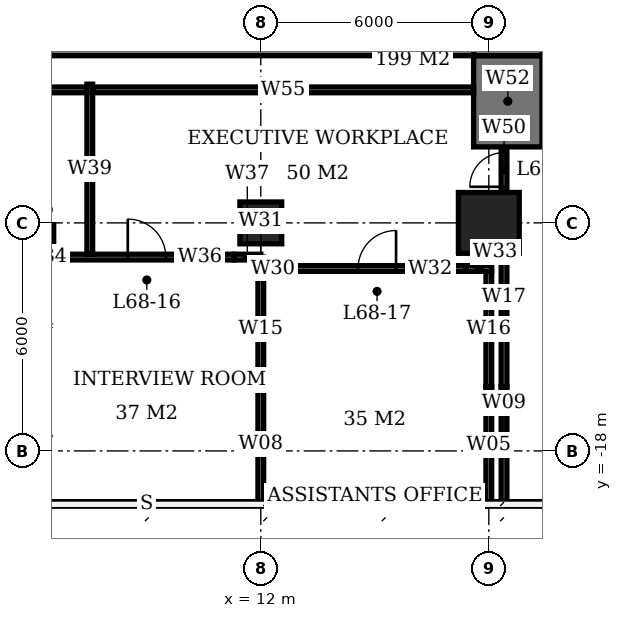
"""IFC4 building model, lengths in metres.
Left out: names, types, materials, properties, quantities, classifications, styles, units other than length and angle.
Written with IfcOpenShell. Run it as: python <this file> out.ifc"""

import sys

from ifc_helpers import new_model, si_unit, direction, frame, frame_2d, origin, origin_2d, place, context, subcontext, project, spatial, rectangle, extrude, element, fill, save


model = new_model("IFC4")
c1 = context("Model", 3, precision=1e-05, world=origin(), true_north=direction((0.0, 1.0)))
c2 = subcontext(c1, "Body", "Model", "MODEL_VIEW")
j1 = project(units=[si_unit("LENGTHUNIT", "METRE"), si_unit("PLANEANGLEUNIT", "RADIAN")], contexts=[c1])
p1 = place(None, origin())
s1 = spatial("IfcSite", under=j1, at=p1, CompositionType="ELEMENT")
p2 = place(p1, origin())
s2 = spatial("IfcBuilding", under=s1, at=p2, CompositionType="ELEMENT")
p3 = place(p2, frame((0.0, 0.0, 276.2)))
s3 = spatial("IfcBuildingStorey", under=s2, at=p3, CompositionType="ELEMENT", Elevation=276.2)
for number, where, z_axis, x_axis in (
    (1, (6.0, -12.0, 0.0), (0.0, 0.0, 1.0), (1.0, 0.0, 0.0)),
    (2, (12.0, -12.0, 0.0), (0.0, 0.0, 1.0), (1.0, 0.0, 0.0)),
):
    element("IfcColumn", number, at=place(p3, frame(where, z_axis=z_axis, x_axis=x_axis)), inside=s3, PredefinedType="COLUMN", context=c2, shape_type="SweptSolid", body=[
        extrude(rectangle(XDim=1.1, YDim=1.1, at=origin_2d()), origin(), (0.0, 0.0, 1.0), 3.9),
    ])
p4 = place(p3, frame((18.0, -12.0, 0.0), z_axis=(0.0, 0.0, 1.0), x_axis=(1.0, 0.0, 0.0)))
e3 = element("IfcColumn", 3, at=p4, inside=s3, PredefinedType="COLUMN", context=c2, shape_type="SweptSolid", body=[
    extrude(rectangle(XDim=1.6, YDim=1.6, at=origin_2d()), origin(), (0.0, 0.0, 1.0), 3.9),
])
p5 = place(p3, frame((-5.6, -6.6, 0.0), z_axis=(0.0, 0.0, 1.0), x_axis=(1.0, 0.0, 0.0)))
e4 = element("IfcWall", 4, at=p5, inside=s3, PredefinedType="SHEAR", context=c2, shape_type="SweptSolid", body=[
    extrude(rectangle(XDim=23.2, YDim=2.0, at=frame_2d((11.6, 0.0))), origin(), (0.0, 0.0, 1.0), 3.9),
])
p6 = place(p3, frame((18.5, -7.6, 0.0), z_axis=(0.0, 0.0, 1.0), x_axis=(0.0, 1.0, 0.0)))
e5 = element("IfcWall", 5, at=p6, inside=s3, PredefinedType="SHEAR", context=c2, shape_type="SweptSolid", body=[
    extrude(rectangle(XDim=21.2, YDim=1.8, at=frame_2d((10.6, 0.0))), origin(), (0.0, 0.0, 1.0), 3.9),
])
p7 = place(p6, frame((9.2, 0.0, 0.0)))
e6 = element("IfcOpeningElement", 6, at=p7, cuts=e5, PredefinedType="OPENING", context=c2, shape_type="SweptSolid", body=[
    extrude(rectangle(XDim=1.8, YDim=2.4, at=frame_2d((0.9, 1.2))), frame((0.0, 0.91, 0.0), z_axis=(0.0, -1.0, 0.0), x_axis=(1.0, 0.0, 0.0)), (0.0, 0.0, 1.0), 1.82),
])
p8 = place(p3, frame((18.5, -10.0, 0.0), z_axis=(0.0, 0.0, 1.0), x_axis=(0.0, 1.0, 0.0)))
e7 = element("IfcWall", 7, at=p8, inside=s3, PredefinedType="SHEAR", context=c2, shape_type="SweptSolid", body=[
    extrude(rectangle(XDim=2.4, YDim=1.8, at=frame_2d((1.2, 0.0))), origin(), (0.0, 0.0, 1.0), 3.9),
])
p9 = place(p3, frame((11.925, -13.2, 0.0), z_axis=(0.0, 0.0, 1.0), x_axis=(1.0, 0.0, 0.0)))
e8 = element("IfcWall", 8, at=p9, inside=s3, PredefinedType="PARTITIONING", context=c2, shape_type="SweptSolid", body=[
    extrude(rectangle(XDim=0.785, YDim=0.15, at=frame_2d((0.393, 0.0))), origin(), (0.0, 0.0, 1.0), 2.65),
])
p10 = place(p3, frame((12.71, -13.2, 0.0), z_axis=(0.0, 0.0, 1.0), x_axis=(1.0, 0.0, 0.0)))
e9 = element("IfcWall", 9, at=p10, inside=s3, PredefinedType="PARTITIONING", context=c2, shape_type="SweptSolid", body=[
    extrude(rectangle(XDim=4.698, YDim=0.15, at=frame_2d((2.349, 0.0))), origin(), (0.0, 0.0, 1.0), 3.65),
])
p11 = place(p10, frame((1.849, 0.0, 0.0)))
e10 = element("IfcOpeningElement", 10, at=p11, cuts=e9, PredefinedType="OPENING", context=c2, shape_type="SweptSolid", body=[
    extrude(rectangle(XDim=1.0, YDim=2.4, at=frame_2d((0.5, 1.2))), frame((0.0, 0.085, 0.0), z_axis=(0.0, -1.0, 0.0), x_axis=(1.0, 0.0, 0.0)), (0.0, 0.0, 1.0), 0.17),
])
p12 = place(p3, frame((17.408, -13.2, 0.0), z_axis=(0.0, 0.0, 1.0), x_axis=(1.0, 0.0, 0.0)))
e11 = element("IfcWall", 11, at=p12, inside=s3, PredefinedType="PARTITIONING", context=c2, shape_type="SweptSolid", body=[
    extrude(rectangle(XDim=0.667, YDim=0.15, at=frame_2d((0.333, 0.0))), origin(), (0.0, 0.0, 1.0), 2.65),
])
p13 = place(p3, frame((5.925, -12.9, 0.0), z_axis=(0.0, 0.0, 1.0), x_axis=(1.0, 0.0, 0.0)))
e12 = element("IfcWall", 12, at=p13, inside=s3, PredefinedType="PARTITIONING", context=c2, shape_type="SweptSolid", body=[
    extrude(rectangle(XDim=0.785, YDim=0.15, at=frame_2d((0.393, 0.0))), origin(), (0.0, 0.0, 1.0), 2.65),
])
p14 = place(p3, frame((6.71, -12.9, 0.0), z_axis=(0.0, 0.0, 1.0), x_axis=(1.0, 0.0, 0.0)))
e13 = element("IfcWall", 13, at=p14, inside=s3, PredefinedType="PARTITIONING", context=c2, shape_type="SweptSolid", body=[
    extrude(rectangle(XDim=4.58, YDim=0.15, at=frame_2d((2.29, 0.0))), origin(), (0.0, 0.0, 1.0), 3.65),
])
p15 = place(p14, frame((1.79, 0.0, 0.0)))
e14 = element("IfcOpeningElement", 14, at=p15, cuts=e13, PredefinedType="OPENING", context=c2, shape_type="SweptSolid", body=[
    extrude(rectangle(XDim=1.0, YDim=2.4, at=frame_2d((0.5, 1.2))), frame((0.0, 0.085, 0.0), z_axis=(0.0, -1.0, 0.0), x_axis=(1.0, 0.0, 0.0)), (0.0, 0.0, 1.0), 0.17),
])
p16 = place(p3, frame((11.29, -12.9, 0.0), z_axis=(0.0, 0.0, 1.0), x_axis=(1.0, 0.0, 0.0)))
e15 = element("IfcWall", 15, at=p16, inside=s3, PredefinedType="PARTITIONING", context=c2, shape_type="SweptSolid", body=[
    extrude(rectangle(XDim=0.71, YDim=0.15, at=frame_2d((0.355, 0.0))), origin(), (0.0, 0.0, 1.0), 2.65),
])
p17 = place(p3, frame((12.0, -19.35, 0.0), z_axis=(0.0, 0.0, 1.0), x_axis=(0.0, 1.0, 0.0)))
e16 = element("IfcWall", 16, at=p17, inside=s3, PredefinedType="PARTITIONING", context=c2, shape_type="SweptSolid", body=[
    extrude(rectangle(XDim=3.04, YDim=0.15, at=frame_2d((1.52, 0.0))), origin(), (0.0, 0.0, 1.0), 3.65),
])
p18 = place(p3, frame((12.0, -16.31, 0.0), z_axis=(0.0, 0.0, 1.0), x_axis=(0.0, 1.0, 0.0)))
e17 = element("IfcWall", 17, at=p18, inside=s3, PredefinedType="PARTITIONING", context=c2, shape_type="SweptSolid", body=[
    extrude(rectangle(XDim=3.035, YDim=0.15, at=frame_2d((1.518, 0.0))), origin(), (0.0, 0.0, 1.0), 2.65),
])
p19 = place(p3, frame((12.0, -13.2, 0.0), z_axis=(0.0, 0.0, 1.0), x_axis=(0.0, 1.0, 0.0)))
e18 = element("IfcWall", 18, at=p19, inside=s3, PredefinedType="PARTITIONING", context=c2, shape_type="SweptSolid", body=[
    extrude(rectangle(XDim=0.3, YDim=0.15, at=frame_2d((0.15, 0.0))), origin(), (0.0, 0.0, 1.0), 2.65),
])
p20 = place(p3, frame((18.0, -19.375, 0.0), z_axis=(0.0, 0.0, 1.0), x_axis=(0.0, 1.0, 0.0)))
e19 = element("IfcWall", 19, at=p20, inside=s3, PredefinedType="PARTITIONING", context=c2, shape_type="SweptSolid", body=[
    extrude(rectangle(XDim=3.065, YDim=0.15, at=frame_2d((1.532, 0.0))), origin(), (0.0, 0.0, 1.0), 3.65),
])
p21 = place(p3, frame((18.0, -16.31, 0.0), z_axis=(0.0, 0.0, 1.0), x_axis=(0.0, 1.0, 0.0)))
e20 = element("IfcWall", 20, at=p21, inside=s3, PredefinedType="PARTITIONING", context=c2, shape_type="SweptSolid", body=[
    extrude(rectangle(XDim=3.035, YDim=0.15, at=frame_2d((1.518, 0.0))), origin(), (0.0, 0.0, 1.0), 2.65),
])
p22 = place(p3, frame((7.425, -8.5, 0.0), z_axis=(0.0, 0.0, 1.0), x_axis=(-1.0, 0.0, 0.0)))
e21 = element("IfcWall", 21, at=p22, inside=s3, PredefinedType="PARTITIONING", context=c2, shape_type="SweptSolid", body=[
    extrude(rectangle(XDim=13.025, YDim=0.15, at=frame_2d((6.513, 0.0))), origin(), (0.0, 0.0, 1.0), 3.65),
])
p23 = place(p22, frame((7.94, 0.0, 0.0)))
e22 = element("IfcOpeningElement", 22, at=p23, cuts=e21, PredefinedType="OPENING", context=c2, shape_type="SweptSolid", body=[
    extrude(rectangle(XDim=1.0, YDim=2.4, at=frame_2d((0.5, 1.2))), frame((0.0, 0.085, 0.0), z_axis=(0.0, -1.0, 0.0), x_axis=(1.0, 0.0, 0.0)), (0.0, 0.0, 1.0), 0.17),
])
p24 = place(p3, frame((7.5, -12.825, 0.0), z_axis=(0.0, 0.0, 1.0), x_axis=(0.0, 1.0, 0.0)))
e23 = element("IfcWall", 23, at=p24, inside=s3, PredefinedType="PARTITIONING", context=c2, shape_type="SweptSolid", body=[
    extrude(rectangle(XDim=4.475, YDim=0.15, at=frame_2d((2.237, 0.0))), origin(), (0.0, 0.0, 1.0), 3.65),
])
p25 = place(p3, frame((7.575, -8.5, 0.0), z_axis=(0.0, 0.0, 1.0), x_axis=(1.0, 0.0, 0.0)))
e24 = element("IfcWall", 24, at=p25, inside=s3, PredefinedType="PARTITIONING", context=c2, shape_type="SweptSolid", body=[
    extrude(rectangle(XDim=10.025, YDim=0.15, at=frame_2d((5.013, 0.0))), origin(), (0.0, 0.0, 1.0), 3.65),
])
p26 = place(p3, frame((18.4, -19.35, 0.0), z_axis=(0.0, 0.0, 1.0), x_axis=(0.0, 1.0, 0.0)))
e25 = element("IfcWall", 25, at=p26, inside=s3, PredefinedType="PARTITIONING", context=c2, shape_type="SweptSolid", body=[
    extrude(rectangle(XDim=3.04, YDim=0.15, at=frame_2d((1.52, 0.0))), origin(), (0.0, 0.0, 1.0), 3.65),
])
p27 = place(p3, frame((18.4, -16.31, 0.0), z_axis=(0.0, 0.0, 1.0), x_axis=(0.0, 1.0, 0.0)))
e26 = element("IfcWall", 26, at=p27, inside=s3, PredefinedType="PARTITIONING", context=c2, shape_type="SweptSolid", body=[
    extrude(rectangle(XDim=3.51, YDim=0.15, at=frame_2d((1.755, 0.0))), origin(), (0.0, 0.0, 1.0), 2.65),
])
p28 = place(p3, frame((18.4, -11.2, 0.0), z_axis=(0.0, 0.0, 1.0), x_axis=(0.0, 1.0, 0.0)))
e27 = element("IfcWall", 27, at=p28, inside=s3, PredefinedType="PARTITIONING", context=c2, shape_type="SweptSolid", body=[
    extrude(rectangle(XDim=1.2, YDim=0.15, at=frame_2d((0.6, 0.0))), origin(), (0.0, 0.0, 1.0), 3.65),
])
p29 = place(p28, frame((0.15, 0.0, 0.0)))
e28 = element("IfcOpeningElement", 28, at=p29, cuts=e27, PredefinedType="OPENING", context=c2, shape_type="SweptSolid", body=[
    extrude(rectangle(XDim=0.9, YDim=2.1, at=frame_2d((0.45, 1.05))), frame((0.0, 0.085, 0.0), z_axis=(0.0, -1.0, 0.0), x_axis=(1.0, 0.0, 0.0)), (0.0, 0.0, 1.0), 0.17),
])
p30 = place(p15, origin())
e29 = element("IfcDoor", 29, at=p30, inside=s3, OperationType="SINGLE_SWING_LEFT", PredefinedType="DOOR", context=c2, shape_type="SweptSolid", body=[
    extrude(rectangle(XDim=1.0, YDim=2.4, at=frame_2d((0.5, 1.2))), frame((0.0, 0.025, 0.0), z_axis=(0.0, -1.0, 0.0), x_axis=(1.0, 0.0, 0.0)), (0.0, 0.0, 1.0), 0.05),
])
fill(e14, e29)
p31 = place(p11, origin())
e30 = element("IfcDoor", 30, at=p31, inside=s3, OperationType="SINGLE_SWING_RIGHT", PredefinedType="DOOR", context=c2, shape_type="SweptSolid", body=[
    extrude(rectangle(XDim=1.0, YDim=2.4, at=frame_2d((0.5, 1.2))), frame((0.0, 0.025, 0.0), z_axis=(0.0, -1.0, 0.0), x_axis=(1.0, 0.0, 0.0)), (0.0, 0.0, 1.0), 0.05),
])
fill(e10, e30)
p32 = place(p29, origin())
e31 = element("IfcDoor", 31, at=p32, inside=s3, OperationType="SINGLE_SWING_LEFT", PredefinedType="DOOR", context=c2, shape_type="SweptSolid", body=[
    extrude(rectangle(XDim=0.9, YDim=2.1, at=frame_2d((0.45, 1.05))), frame((0.0, 0.025, 0.0), z_axis=(0.0, -1.0, 0.0), x_axis=(1.0, 0.0, 0.0)), (0.0, 0.0, 1.0), 0.05),
])
fill(e28, e31)
save(model, sys.argv[1])
